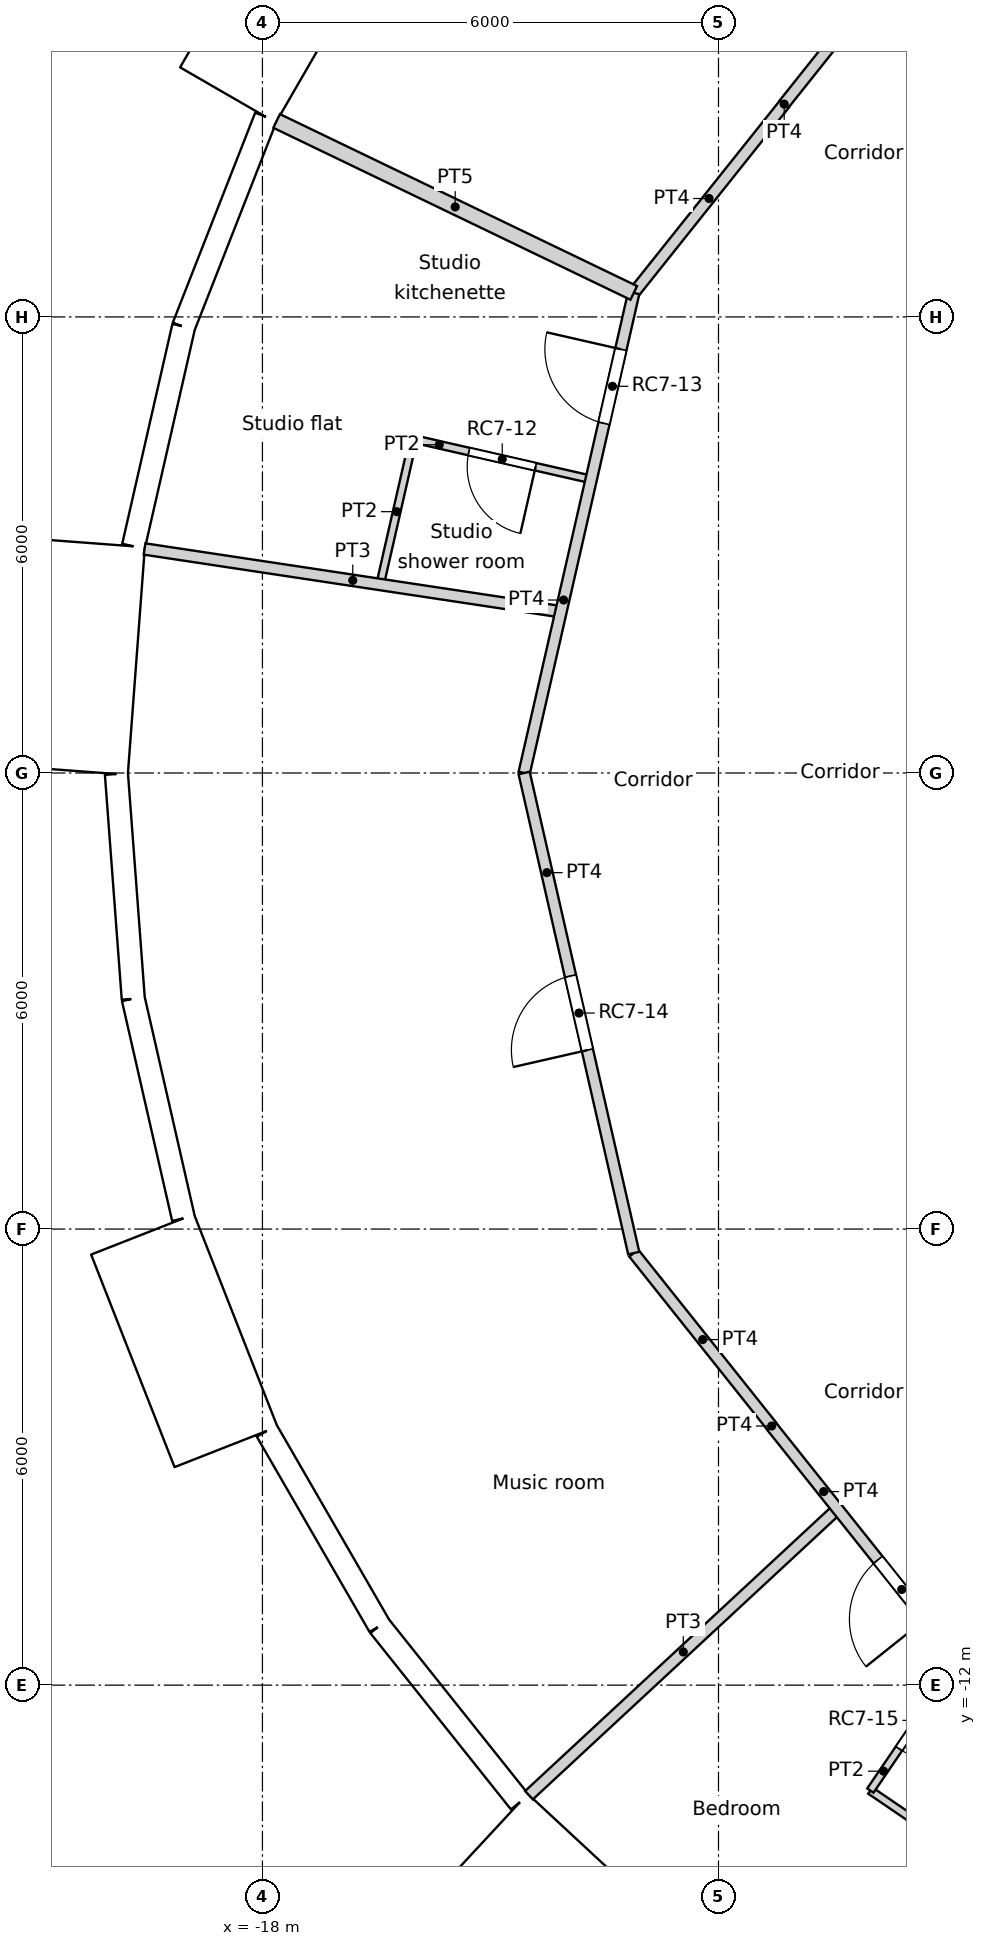
"""IFC4 building model, lengths in metres.
Left out: names, types, materials, properties, quantities, classifications, styles, units other than length and angle.
Written with IfcOpenShell. Run it as: python <this file> out.ifc"""

import sys

from ifc_helpers import new_model, si_unit, direction, frame, frame_2d, origin, origin_2d, place, context, subcontext, project, spatial, rectangle, circle, extrude, element, fill, save


model = new_model("IFC4")
c1 = context("Model", 3, precision=1e-05, world=origin(), true_north=direction((0.0, 1.0)))
c2 = subcontext(c1, "Body", "Model", "MODEL_VIEW")
j1 = project(units=[si_unit("LENGTHUNIT", "METRE"), si_unit("PLANEANGLEUNIT", "RADIAN")], contexts=[c1])
p1 = place(None, origin())
s1 = spatial("IfcSite", under=j1, at=p1, CompositionType="ELEMENT")
p2 = place(p1, origin())
s2 = spatial("IfcBuilding", under=s1, at=p2, CompositionType="ELEMENT")
p3 = place(p2, frame((0.0, 0.0, 294.6)))
s3 = spatial("IfcBuildingStorey", under=s2, at=p3, CompositionType="ELEMENT", Elevation=294.6)
for number, where, z_axis, x_axis in (
    (1, (-16.958, 8.167, 0.0), (0.0, 0.0, 1.0), (1.0, 0.0, 0.0)),
    (2, (-18.612, 2.805, 0.0), (0.0, 0.0, 1.0), (1.0, 0.0, 0.0)),
    (3, (-18.612, -2.805, 0.0), (0.0, 0.0, 1.0), (1.0, 0.0, 0.0)),
    (4, (-16.958, -8.167, 0.0), (0.0, 0.0, 1.0), (1.0, 0.0, 0.0)),
    (5, (-13.798, -12.802, 0.0), (0.0, 0.0, 1.0), (1.0, 0.0, 0.0)),
):
    element("IfcColumn", number, at=place(p3, frame(where, z_axis=z_axis, x_axis=x_axis)), inside=s3, PredefinedType="COLUMN", context=c2, shape_type="SweptSolid", body=[
        extrude(circle(Radius=0.45, at=origin_2d()), origin(), (0.0, 0.0, 1.0), 3.6),
    ])
p4 = place(p3, frame((-16.952, 11.52, -0.35), z_axis=(0.0, 0.0, 1.0), x_axis=(-0.499990139034, -0.866031096941, 0.0)))
e6 = element("IfcWall", 6, at=p4, inside=s3, PredefinedType="ELEMENTEDWALL", context=c2, shape_type="SweptSolid", body=[
    extrude(rectangle(XDim=3.0, YDim=1.45, at=frame_2d((1.5, 0.0))), origin(), (0.0, 0.0, 1.0), 3.6),
])
p5 = place(p4, frame((1.5, 0.0, 1.9)))
e7 = element("IfcOpeningElement", 7, at=p5, cuts=e6, PredefinedType="OPENING", context=c2, shape_type="SweptSolid", body=[
    extrude(circle(Radius=0.9, at=origin_2d()), frame((0.0, 0.735, 0.0), z_axis=(0.0, -1.0, 0.0), x_axis=(1.0, 0.0, 0.0)), (0.0, 0.0, 1.0), 1.47),
])
p6 = place(p3, frame((-17.955, 8.629, 0.0), z_axis=(0.0, 0.0, 1.0), x_axis=(-0.36530043032, -0.930889679612, 0.0)))
e8 = element("IfcWall", 8, at=p6, inside=s3, PredefinedType="SOLIDWALL", context=c2, shape_type="SweptSolid", body=[
    extrude(rectangle(XDim=2.962, YDim=0.3, at=frame_2d((1.481, 0.0))), origin(), (0.0, 0.0, 1.0), 3.25),
])
p7 = place(p6, frame((1.481, 0.0, 1.55)))
e9 = element("IfcOpeningElement", 9, at=p7, cuts=e8, PredefinedType="OPENING", context=c2, shape_type="SweptSolid", body=[
    extrude(circle(Radius=0.9, at=origin_2d()), frame((0.0, 0.16, 0.0), z_axis=(0.0, -1.0, 0.0), x_axis=(1.0, 0.0, 0.0)), (0.0, 0.0, 1.0), 0.32),
])
p8 = place(p3, frame((-19.037, 5.872, 0.0), z_axis=(0.0, 0.0, 1.0), x_axis=(-0.222529389789, -0.974925982155, 0.0)))
e10 = element("IfcWall", 10, at=p8, inside=s3, PredefinedType="SOLIDWALL", context=c2, shape_type="SweptSolid", body=[
    extrude(rectangle(XDim=2.962, YDim=0.3, at=frame_2d((1.481, 0.0))), origin(), (0.0, 0.0, 1.0), 3.25),
])
p9 = place(p8, frame((1.481, 0.0, 1.55)))
e11 = element("IfcOpeningElement", 11, at=p9, cuts=e10, PredefinedType="OPENING", context=c2, shape_type="SweptSolid", body=[
    extrude(circle(Radius=0.9, at=origin_2d()), frame((0.0, 0.16, 0.0), z_axis=(0.0, -1.0, 0.0), x_axis=(1.0, 0.0, 0.0)), (0.0, 0.0, 1.0), 0.32),
])
p10 = place(p3, frame((-20.272, 3.023, -0.35), z_axis=(0.0, 0.0, 1.0), x_axis=(-0.074785902127, -0.997199613339, 0.0)))
e12 = element("IfcWall", 12, at=p10, inside=s3, PredefinedType="ELEMENTEDWALL", context=c2, shape_type="SweptSolid", body=[
    extrude(rectangle(XDim=3.0, YDim=1.45, at=frame_2d((1.5, 0.0))), origin(), (0.0, 0.0, 1.0), 3.6),
])
p11 = place(p10, frame((1.5, 0.0, 1.9)))
e13 = element("IfcOpeningElement", 13, at=p11, cuts=e12, PredefinedType="OPENING", context=c2, shape_type="SweptSolid", body=[
    extrude(circle(Radius=0.9, at=origin_2d()), frame((0.0, 0.735, 0.0), z_axis=(0.0, -1.0, 0.0), x_axis=(1.0, 0.0, 0.0)), (0.0, 0.0, 1.0), 1.47),
])
p12 = place(p3, frame((-19.921, -0.015, 0.0), z_axis=(0.0, 0.0, 1.0), x_axis=(0.07474897196, -0.997202382263, 0.0)))
e14 = element("IfcWall", 14, at=p12, inside=s3, PredefinedType="SOLIDWALL", context=c2, shape_type="SweptSolid", body=[
    extrude(rectangle(XDim=2.962, YDim=0.3, at=frame_2d((1.481, 0.0))), origin(), (0.0, 0.0, 1.0), 3.25),
])
p13 = place(p12, frame((1.481, 0.0, 1.55)))
e15 = element("IfcOpeningElement", 15, at=p13, cuts=e14, PredefinedType="OPENING", context=c2, shape_type="SweptSolid", body=[
    extrude(circle(Radius=0.9, at=origin_2d()), frame((0.0, 0.16, 0.0), z_axis=(0.0, -1.0, 0.0), x_axis=(1.0, 0.0, 0.0)), (0.0, 0.0, 1.0), 0.32),
])
p14 = place(p3, frame((-19.699, -2.969, 0.0), z_axis=(0.0, 0.0, 1.0), x_axis=(0.222529389789, -0.974925982155, 0.0)))
e16 = element("IfcWall", 16, at=p14, inside=s3, PredefinedType="SOLIDWALL", context=c2, shape_type="SweptSolid", body=[
    extrude(rectangle(XDim=2.962, YDim=0.3, at=frame_2d((1.481, 0.0))), origin(), (0.0, 0.0, 1.0), 3.25),
])
p15 = place(p14, frame((1.481, 0.0, 1.55)))
e17 = element("IfcOpeningElement", 17, at=p15, cuts=e16, PredefinedType="OPENING", context=c2, shape_type="SweptSolid", body=[
    extrude(circle(Radius=0.9, at=origin_2d()), frame((0.0, 0.16, 0.0), z_axis=(0.0, -1.0, 0.0), x_axis=(1.0, 0.0, 0.0)), (0.0, 0.0, 1.0), 0.32),
])
p16 = place(p3, frame((-19.576, -6.072, -0.35), z_axis=(0.0, 0.0, 1.0), x_axis=(0.36537792632, -0.93085926485, 0.0)))
e18 = element("IfcWall", 18, at=p16, inside=s3, PredefinedType="ELEMENTEDWALL", context=c2, shape_type="SweptSolid", body=[
    extrude(rectangle(XDim=3.0, YDim=1.45, at=frame_2d((1.5, 0.0))), origin(), (0.0, 0.0, 1.0), 3.6),
])
p17 = place(p16, frame((1.5, 0.0, 1.9)))
e19 = element("IfcOpeningElement", 19, at=p17, cuts=e18, PredefinedType="OPENING", context=c2, shape_type="SweptSolid", body=[
    extrude(circle(Radius=0.9, at=origin_2d()), frame((0.0, 0.735, 0.0), z_axis=(0.0, -1.0, 0.0), x_axis=(1.0, 0.0, 0.0)), (0.0, 0.0, 1.0), 1.47),
])
p18 = place(p3, frame((-17.941, -8.657, 0.0), z_axis=(0.0, 0.0, 1.0), x_axis=(0.499950756475, -0.86605383268, 0.0)))
e20 = element("IfcWall", 20, at=p18, inside=s3, PredefinedType="SOLIDWALL", context=c2, shape_type="SweptSolid", body=[
    extrude(rectangle(XDim=2.962, YDim=0.3, at=frame_2d((1.481, 0.0))), origin(), (0.0, 0.0, 1.0), 3.25),
])
p19 = place(p18, frame((1.481, 0.0, 1.55)))
e21 = element("IfcOpeningElement", 21, at=p19, cuts=e20, PredefinedType="OPENING", context=c2, shape_type="SweptSolid", body=[
    extrude(circle(Radius=0.9, at=origin_2d()), frame((0.0, 0.16, 0.0), z_axis=(0.0, -1.0, 0.0), x_axis=(1.0, 0.0, 0.0)), (0.0, 0.0, 1.0), 0.32),
])
p20 = place(p3, frame((-16.46, -11.222, 0.0), z_axis=(0.0, 0.0, 1.0), x_axis=(0.623498236992, -0.781824755599, 0.0)))
e22 = element("IfcWall", 22, at=p20, inside=s3, PredefinedType="SOLIDWALL", context=c2, shape_type="SweptSolid", body=[
    extrude(rectangle(XDim=2.962, YDim=0.3, at=frame_2d((1.481, 0.0))), origin(), (0.0, 0.0, 1.0), 3.25),
])
p21 = place(p20, frame((1.481, 0.0, 1.55)))
e23 = element("IfcOpeningElement", 23, at=p21, cuts=e22, PredefinedType="OPENING", context=c2, shape_type="SweptSolid", body=[
    extrude(circle(Radius=0.9, at=origin_2d()), frame((0.0, 0.16, 0.0), z_axis=(0.0, -1.0, 0.0), x_axis=(1.0, 0.0, 0.0)), (0.0, 0.0, 1.0), 0.32),
])
p22 = place(p3, frame((-15.003, -13.964, -0.35), z_axis=(0.0, 0.0, 1.0), x_axis=(0.733022439167, -0.680204457261, 0.0)))
e24 = element("IfcWall", 24, at=p22, inside=s3, PredefinedType="ELEMENTEDWALL", context=c2, shape_type="SweptSolid", body=[
    extrude(rectangle(XDim=3.0, YDim=1.45, at=frame_2d((1.5, 0.0))), origin(), (0.0, 0.0, 1.0), 3.6),
])
p23 = place(p22, frame((1.5, 0.0, 1.9)))
e25 = element("IfcOpeningElement", 25, at=p23, cuts=e24, PredefinedType="OPENING", context=c2, shape_type="SweptSolid", body=[
    extrude(circle(Radius=0.9, at=origin_2d()), frame((0.0, 0.735, 0.0), z_axis=(0.0, -1.0, 0.0), x_axis=(1.0, 0.0, 0.0)), (0.0, 0.0, 1.0), 1.47),
])
p24 = place(p3, frame((-11.134, 8.8, 0.0), z_axis=(0.0, 0.0, 1.0), x_axis=(-1.0, 0.0, 0.0)))
e26 = element("IfcWall", 26, at=p24, inside=s3, PredefinedType="PARTITIONING", context=c2, shape_type="SweptSolid", body=[
    extrude(rectangle(XDim=0.003, YDim=0.15, at=frame_2d((0.001, 0.0))), origin(), (0.0, 0.0, 1.0), 3.25),
])
p25 = place(p3, frame((-11.136, 8.802, 0.0), z_axis=(0.0, 0.0, 1.0), x_axis=(0.623151397235, 0.782101231379, 0.0)))
e27 = element("IfcWall", 27, at=p25, inside=s3, PredefinedType="PARTITIONING", context=c2, shape_type="SweptSolid", body=[
    extrude(rectangle(XDim=3.301, YDim=0.15, at=frame_2d((1.65, 0.0))), origin(), (0.0, 0.0, 1.0), 3.25),
])
p26 = place(p3, frame((-11.3, -8.596, 0.0), z_axis=(0.0, 0.0, 1.0), x_axis=(0.623390921228, -0.781910326911, 0.0)))
e28 = element("IfcWall", 28, at=p26, inside=s3, PredefinedType="PARTITIONING", context=c2, shape_type="SweptSolid", body=[
    extrude(rectangle(XDim=3.564, YDim=0.15, at=frame_2d((1.782, 0.0))), origin(), (0.0, 0.0, 1.0), 3.25),
])
p27 = place(p26, frame((2.244, 0.0, 0.0)))
e29 = element("IfcOpeningElement", 29, at=p27, cuts=e28, PredefinedType="OPENING", context=c2, shape_type="SweptSolid", body=[
    extrude(rectangle(XDim=1.0, YDim=2.1, at=frame_2d((0.5, 1.05))), frame((0.0, 0.075, 0.0), z_axis=(0.0, -1.0, 0.0), x_axis=(1.0, 0.0, 0.0)), (0.0, 0.0, 1.0), 0.15),
])
p28 = place(p3, frame((-11.3, -8.596, 0.0), z_axis=(0.0, 0.0, 1.0), x_axis=(0.0, 1.0, 0.0)))
e30 = element("IfcWall", 30, at=p28, inside=s3, PredefinedType="PARTITIONING", context=c2, shape_type="SweptSolid", body=[
    extrude(rectangle(XDim=0.01, YDim=0.15, at=frame_2d((0.005, 0.0))), origin(), (0.0, 0.0, 1.0), 3.25),
])
p29 = place(p3, frame((-13.115, 6.316, 0.0), z_axis=(0.0, 0.0, 1.0), x_axis=(0.623476099415, 0.781842409606, 0.0)))
e31 = element("IfcWall", 31, at=p29, inside=s3, PredefinedType="PARTITIONING", context=c2, shape_type="SweptSolid", body=[
    extrude(rectangle(XDim=3.177, YDim=0.15, at=frame_2d((1.589, 0.0))), origin(), (0.0, 0.0, 1.0), 3.25),
])
p30 = place(p3, frame((-14.557, 0.0, 0.0), z_axis=(0.0, 0.0, 1.0), x_axis=(0.222533159771, 0.974925121639, 0.0)))
e32 = element("IfcWall", 32, at=p30, inside=s3, PredefinedType="PARTITIONING", context=c2, shape_type="SweptSolid", body=[
    extrude(rectangle(XDim=6.478, YDim=0.15, at=frame_2d((3.239, 0.0))), origin(), (0.0, 0.0, 1.0), 3.25),
])
p31 = place(p30, frame((4.718, 0.0, 0.0)))
e33 = element("IfcOpeningElement", 33, at=p31, cuts=e32, PredefinedType="OPENING", context=c2, shape_type="SweptSolid", body=[
    extrude(rectangle(XDim=1.0, YDim=2.1, at=frame_2d((0.5, 1.05))), frame((0.0, 0.075, 0.0), z_axis=(0.0, -1.0, 0.0), x_axis=(1.0, 0.0, 0.0)), (0.0, 0.0, 1.0), 0.15),
])
p32 = place(p3, frame((-13.115, -6.316, 0.0), z_axis=(0.0, 0.0, 1.0), x_axis=(0.623446514299, -0.781866001185, 0.0)))
e34 = element("IfcWall", 34, at=p32, inside=s3, PredefinedType="PARTITIONING", context=c2, shape_type="SweptSolid", body=[
    extrude(rectangle(XDim=2.911, YDim=0.15, at=frame_2d((1.456, 0.0))), origin(), (0.0, 0.0, 1.0), 3.25),
])
p33 = place(p3, frame((-14.557, 0.0, 0.0), z_axis=(0.0, 0.0, 1.0), x_axis=(0.222568978642, -0.97491694505, 0.0)))
e35 = element("IfcWall", 35, at=p33, inside=s3, PredefinedType="PARTITIONING", context=c2, shape_type="SweptSolid", body=[
    extrude(rectangle(XDim=6.479, YDim=0.15, at=frame_2d((3.239, 0.0))), origin(), (0.0, 0.0, 1.0), 3.25),
])
p34 = place(p33, frame((2.74, 0.0, 0.0)))
e36 = element("IfcOpeningElement", 36, at=p34, cuts=e35, PredefinedType="OPENING", context=c2, shape_type="SweptSolid", body=[
    extrude(rectangle(XDim=1.0, YDim=2.04, at=frame_2d((0.5, 1.02))), frame((0.0, 0.075, 0.0), z_axis=(0.0, -1.0, 0.0), x_axis=(1.0, 0.0, 0.0)), (0.0, 0.0, 1.0), 0.15),
])
p35 = place(p3, frame((-17.813, 8.578, 0.0), z_axis=(0.0, 0.0, 1.0), x_axis=(0.901022681876, -0.433771975518, 0.0)))
e37 = element("IfcWall", 37, at=p35, inside=s3, PredefinedType="PARTITIONING", context=c2, shape_type="SweptSolid", body=[
    extrude(rectangle(XDim=5.214, YDim=0.2, at=frame_2d((2.607, 0.0))), origin(), (0.0, 0.0, 1.0), 3.25),
])
p36 = place(p3, frame((-16.015, 4.396, 0.0), z_axis=(0.0, 0.0, 1.0), x_axis=(0.97493862442, -0.222473995368, 0.0)))
e38 = element("IfcWall", 38, at=p36, inside=s3, PredefinedType="PARTITIONING", context=c2, shape_type="SweptSolid", body=[
    extrude(rectangle(XDim=2.4, YDim=0.1, at=frame_2d((1.2, 0.0))), origin(), (0.0, 0.0, 1.0), 3.25),
])
p37 = place(p36, frame((0.75, 0.0, 0.0)))
e39 = element("IfcOpeningElement", 39, at=p37, cuts=e38, PredefinedType="OPENING", context=c2, shape_type="SweptSolid", body=[
    extrude(rectangle(XDim=0.9, YDim=2.04, at=frame_2d((0.45, 1.02))), frame((0.0, 0.05, 0.0), z_axis=(0.0, -1.0, 0.0), x_axis=(1.0, 0.0, 0.0)), (0.0, 0.0, 1.0), 0.1),
])
p38 = place(p3, frame((-16.452, 2.48, 0.0), z_axis=(0.0, 0.0, 1.0), x_axis=(0.22237276708, 0.974961718459, 0.0)))
e40 = element("IfcWall", 40, at=p38, inside=s3, PredefinedType="PARTITIONING", context=c2, shape_type="SweptSolid", body=[
    extrude(rectangle(XDim=1.965, YDim=0.1, at=frame_2d((0.983, 0.0))), origin(), (0.0, 0.0, 1.0), 3.25),
])
p39 = place(p3, frame((-19.551, 2.947, 0.0), z_axis=(0.0, 0.0, 1.0), x_axis=(0.988837218495, -0.148999850064, 0.0)))
e41 = element("IfcWall", 41, at=p39, inside=s3, PredefinedType="PARTITIONING", context=c2, shape_type="SweptSolid", body=[
    extrude(rectangle(XDim=5.54, YDim=0.15, at=frame_2d((2.77, 0.0))), origin(), (0.0, 0.0, 1.0), 3.25),
])
p40 = place(p3, frame((-14.493, -13.448, 0.0), z_axis=(0.0, 0.0, 1.0), x_axis=(0.73295202722, 0.68028032883, 0.0)))
e42 = element("IfcWall", 42, at=p40, inside=s3, PredefinedType="PARTITIONING", context=c2, shape_type="SweptSolid", body=[
    extrude(rectangle(XDim=5.539, YDim=0.15, at=frame_2d((2.77, 0.0))), origin(), (0.0, 0.0, 1.0), 3.25),
])
p41 = place(p3, frame((-10.002, -13.387, 0.0), z_axis=(0.0, 0.0, 1.0), x_axis=(0.563469042551, 0.826137178734, 0.0)))
e43 = element("IfcWall", 43, at=p41, inside=s3, PredefinedType="PARTITIONING", context=c2, shape_type="SweptSolid", body=[
    extrude(rectangle(XDim=2.234, YDim=0.1, at=frame_2d((1.117, 0.0))), origin(), (0.0, 0.0, 1.0), 3.25),
])
p42 = place(p41, frame((0.667, 0.0, 0.0)))
e44 = element("IfcOpeningElement", 44, at=p42, cuts=e43, PredefinedType="OPENING", context=c2, shape_type="SweptSolid", body=[
    extrude(rectangle(XDim=0.9, YDim=2.04, at=frame_2d((0.45, 1.02))), frame((0.0, 0.05, 0.0), z_axis=(0.0, -1.0, 0.0), x_axis=(1.0, 0.0, 0.0)), (0.0, 0.0, 1.0), 0.1),
])
p43 = place(p3, frame((-10.002, -13.387, 0.0), z_axis=(0.0, 0.0, 1.0), x_axis=(0.82620117489, -0.563375202339, 0.0)))
e45 = element("IfcWall", 45, at=p43, inside=s3, PredefinedType="PARTITIONING", context=c2, shape_type="SweptSolid", body=[
    extrude(rectangle(XDim=1.974, YDim=0.1, at=frame_2d((0.987, 0.0))), origin(), (0.0, 0.0, 1.0), 3.25),
])
p44 = place(p5, origin())
e46 = element("IfcWindow", 46, at=p44, inside=s3, PartitioningType="SINGLE_PANEL", PredefinedType="WINDOW", context=c2, shape_type="SweptSolid", body=[
    extrude(circle(Radius=0.9, at=origin_2d()), frame((0.0, 0.695, 0.0), z_axis=(0.0, -1.0, 0.0), x_axis=(1.0, 0.0, 0.0)), (0.0, 0.0, 1.0), 0.1),
])
fill(e7, e46)
p45 = place(p7, origin())
e47 = element("IfcWindow", 47, at=p45, inside=s3, PartitioningType="SINGLE_PANEL", PredefinedType="WINDOW", context=c2, shape_type="SweptSolid", body=[
    extrude(circle(Radius=0.9, at=origin_2d()), frame((0.0, 0.12, 0.0), z_axis=(0.0, -1.0, 0.0), x_axis=(1.0, 0.0, 0.0)), (0.0, 0.0, 1.0), 0.1),
])
fill(e9, e47)
p46 = place(p9, origin())
e48 = element("IfcWindow", 48, at=p46, inside=s3, PartitioningType="SINGLE_PANEL", PredefinedType="WINDOW", context=c2, shape_type="SweptSolid", body=[
    extrude(circle(Radius=0.9, at=origin_2d()), frame((0.0, 0.12, 0.0), z_axis=(0.0, -1.0, 0.0), x_axis=(1.0, 0.0, 0.0)), (0.0, 0.0, 1.0), 0.1),
])
fill(e11, e48)
p47 = place(p11, origin())
e49 = element("IfcWindow", 49, at=p47, inside=s3, PartitioningType="SINGLE_PANEL", PredefinedType="WINDOW", context=c2, shape_type="SweptSolid", body=[
    extrude(circle(Radius=0.9, at=origin_2d()), frame((0.0, 0.695, 0.0), z_axis=(0.0, -1.0, 0.0), x_axis=(1.0, 0.0, 0.0)), (0.0, 0.0, 1.0), 0.1),
])
fill(e13, e49)
p48 = place(p13, origin())
e50 = element("IfcWindow", 50, at=p48, inside=s3, PartitioningType="SINGLE_PANEL", PredefinedType="WINDOW", context=c2, shape_type="SweptSolid", body=[
    extrude(circle(Radius=0.9, at=origin_2d()), frame((0.0, 0.12, 0.0), z_axis=(0.0, -1.0, 0.0), x_axis=(1.0, 0.0, 0.0)), (0.0, 0.0, 1.0), 0.1),
])
fill(e15, e50)
p49 = place(p15, origin())
e51 = element("IfcWindow", 51, at=p49, inside=s3, PartitioningType="SINGLE_PANEL", PredefinedType="WINDOW", context=c2, shape_type="SweptSolid", body=[
    extrude(circle(Radius=0.9, at=origin_2d()), frame((0.0, 0.12, 0.0), z_axis=(0.0, -1.0, 0.0), x_axis=(1.0, 0.0, 0.0)), (0.0, 0.0, 1.0), 0.1),
])
fill(e17, e51)
p50 = place(p17, origin())
e52 = element("IfcWindow", 52, at=p50, inside=s3, PartitioningType="SINGLE_PANEL", PredefinedType="WINDOW", context=c2, shape_type="SweptSolid", body=[
    extrude(circle(Radius=0.9, at=origin_2d()), frame((0.0, 0.695, 0.0), z_axis=(0.0, -1.0, 0.0), x_axis=(1.0, 0.0, 0.0)), (0.0, 0.0, 1.0), 0.1),
])
fill(e19, e52)
p51 = place(p19, origin())
e53 = element("IfcWindow", 53, at=p51, inside=s3, PartitioningType="SINGLE_PANEL", PredefinedType="WINDOW", context=c2, shape_type="SweptSolid", body=[
    extrude(circle(Radius=0.9, at=origin_2d()), frame((0.0, 0.12, 0.0), z_axis=(0.0, -1.0, 0.0), x_axis=(1.0, 0.0, 0.0)), (0.0, 0.0, 1.0), 0.1),
])
fill(e21, e53)
p52 = place(p21, origin())
e54 = element("IfcWindow", 54, at=p52, inside=s3, PartitioningType="SINGLE_PANEL", PredefinedType="WINDOW", context=c2, shape_type="SweptSolid", body=[
    extrude(circle(Radius=0.9, at=origin_2d()), frame((0.0, 0.12, 0.0), z_axis=(0.0, -1.0, 0.0), x_axis=(1.0, 0.0, 0.0)), (0.0, 0.0, 1.0), 0.1),
])
fill(e23, e54)
p53 = place(p23, origin())
e55 = element("IfcWindow", 55, at=p53, inside=s3, PartitioningType="SINGLE_PANEL", PredefinedType="WINDOW", context=c2, shape_type="SweptSolid", body=[
    extrude(circle(Radius=0.9, at=origin_2d()), frame((0.0, 0.695, 0.0), z_axis=(0.0, -1.0, 0.0), x_axis=(1.0, 0.0, 0.0)), (0.0, 0.0, 1.0), 0.1),
])
fill(e25, e55)
p54 = place(p37, origin())
e56 = element("IfcDoor", 56, at=p54, inside=s3, OperationType="SINGLE_SWING_LEFT", PredefinedType="DOOR", context=c2, shape_type="SweptSolid", body=[
    extrude(rectangle(XDim=0.9, YDim=2.04, at=frame_2d((0.45, 1.02))), frame((0.0, 0.025, 0.0), z_axis=(0.0, -1.0, 0.0), x_axis=(1.0, 0.0, 0.0)), (0.0, 0.0, 1.0), 0.05),
])
fill(e39, e56)
p55 = place(p31, origin())
e57 = element("IfcDoor", 57, at=p55, inside=s3, OperationType="SINGLE_SWING_RIGHT", PredefinedType="DOOR", context=c2, shape_type="SweptSolid", body=[
    extrude(rectangle(XDim=1.0, YDim=2.1, at=frame_2d((0.5, 1.05))), frame((0.0, 0.025, 0.0), z_axis=(0.0, -1.0, 0.0), x_axis=(1.0, 0.0, 0.0)), (0.0, 0.0, 1.0), 0.05),
])
fill(e33, e57)
p56 = place(p34, origin())
e58 = element("IfcDoor", 58, at=p56, inside=s3, OperationType="SINGLE_SWING_LEFT", PredefinedType="DOOR", context=c2, shape_type="SweptSolid", body=[
    extrude(rectangle(XDim=1.0, YDim=2.04, at=frame_2d((0.5, 1.02))), frame((0.0, 0.025, 0.0), z_axis=(0.0, -1.0, 0.0), x_axis=(1.0, 0.0, 0.0)), (0.0, 0.0, 1.0), 0.05),
])
fill(e36, e58)
p57 = place(p42, origin())
e59 = element("IfcDoor", 59, at=p57, inside=s3, OperationType="SINGLE_SWING_LEFT", PredefinedType="DOOR", context=c2, shape_type="SweptSolid", body=[
    extrude(rectangle(XDim=0.9, YDim=2.04, at=frame_2d((0.45, 1.02))), frame((0.0, 0.025, 0.0), z_axis=(0.0, -1.0, 0.0), x_axis=(1.0, 0.0, 0.0)), (0.0, 0.0, 1.0), 0.05),
])
fill(e44, e59)
p58 = place(p27, origin())
e60 = element("IfcDoor", 60, at=p58, inside=s3, OperationType="SINGLE_SWING_LEFT", PredefinedType="DOOR", context=c2, shape_type="SweptSolid", body=[
    extrude(rectangle(XDim=1.0, YDim=2.1, at=frame_2d((0.5, 1.05))), frame((0.0, 0.025, 0.0), z_axis=(0.0, -1.0, 0.0), x_axis=(1.0, 0.0, 0.0)), (0.0, 0.0, 1.0), 0.05),
])
fill(e29, e60)
save(model, sys.argv[1])
